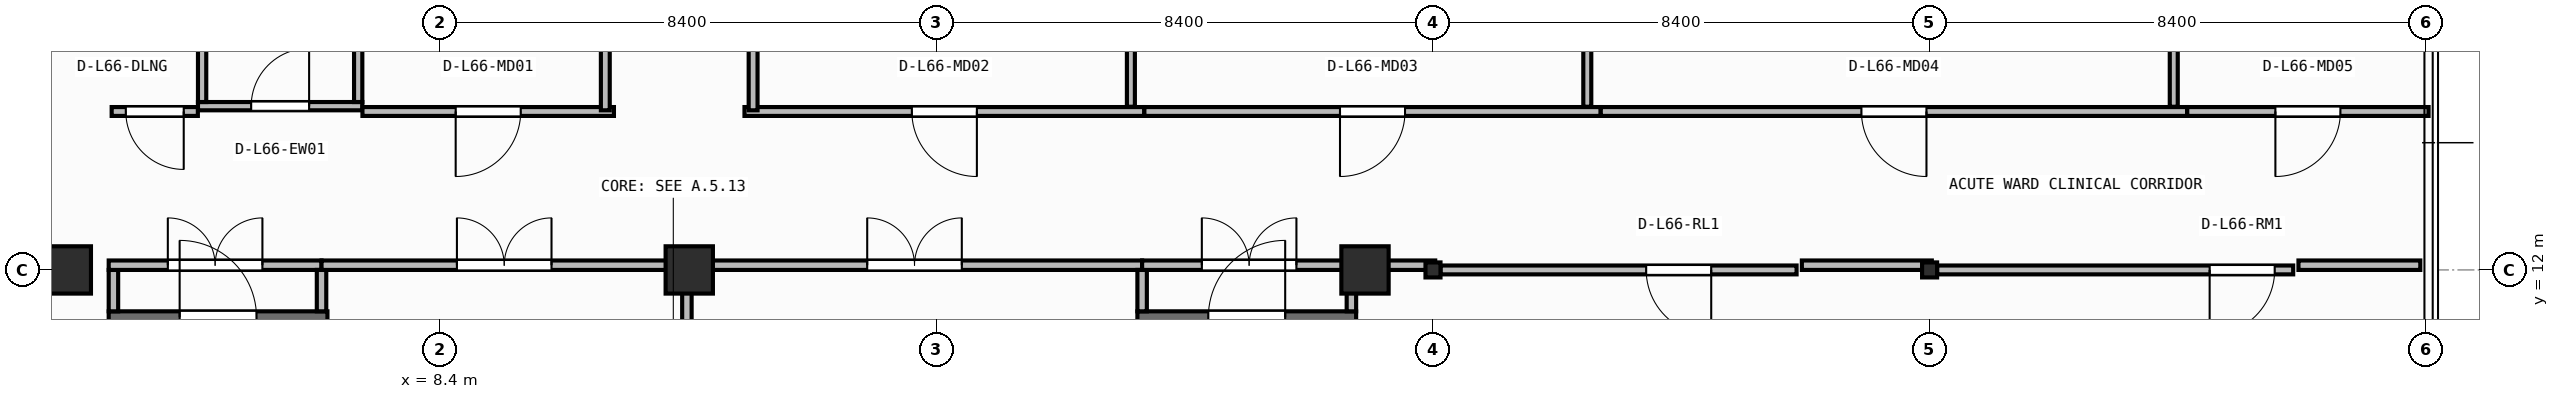
"""IFC4 building model, lengths in metres.
Left out: names, types, materials, properties, quantities, classifications, styles, units other than length and angle.
Written with IfcOpenShell. Run it as: python <this file> out.ifc"""

import sys

from ifc_helpers import new_model, si_unit, direction, frame, frame_2d, origin, origin_2d, place, context, subcontext, project, spatial, rectangle, i_section, extrude, element, fill, save


model = new_model("IFC4")
c1 = context("Model", 3, precision=1e-05, world=origin(), true_north=direction((0.0, 1.0)))
c2 = subcontext(c1, "Body", "Model", "MODEL_VIEW")
j1 = project(units=[si_unit("LENGTHUNIT", "METRE"), si_unit("PLANEANGLEUNIT", "RADIAN")], contexts=[c1])
p1 = place(None, origin())
s1 = spatial("IfcSite", under=j1, at=p1, CompositionType="ELEMENT")
p2 = place(p1, origin())
s2 = spatial("IfcBuilding", under=s1, at=p2, CompositionType="ELEMENT")
p3 = place(p2, frame((0.0, 0.0, 268.4)))
s3 = spatial("IfcBuildingStorey", under=s2, at=p3, CompositionType="ELEMENT", Elevation=268.4)
for number, where, z_axis, x_axis in (
    (1, (2.1, 12.0, 0.0), (0.0, 0.0, 1.0), (1.0, 0.0, 0.0)),
    (2, (12.62, 12.0, 0.0), (0.0, 0.0, 1.0), (1.0, 0.0, 0.0)),
    (3, (24.05, 12.0, 0.0), (0.0, 0.0, 1.0), (1.0, 0.0, 0.0)),
):
    element("IfcColumn", number, at=place(p3, frame(where, z_axis=z_axis, x_axis=x_axis)), inside=s3, PredefinedType="COLUMN", context=c2, shape_type="SweptSolid", body=[
        extrude(rectangle(XDim=0.8, YDim=0.8, at=origin_2d()), origin(), (0.0, 0.0, 1.0), 3.95),
    ])
for number, where, z_axis, x_axis in (
    (4, (25.2, 12.0, 0.0), (0.0, 0.0, 1.0), (1.0, 0.0, 0.0)),
    (5, (33.6, 12.0, 0.0), (0.0, 0.0, 1.0), (1.0, 0.0, 0.0)),
):
    element("IfcColumn", number, at=place(p3, frame(where, z_axis=z_axis, x_axis=x_axis)), inside=s3, PredefinedType="COLUMN", context=c2, shape_type="SweptSolid", body=[
        extrude(i_section(OverallWidth=0.254, OverallDepth=0.254, WebThickness=0.009, FlangeThickness=0.014, FilletRadius=0.013, at=origin_2d()), origin(), (0.0, 0.0, 1.0), 3.95),
    ])
p4 = place(p3, frame((2.8, 11.2, 0.0), z_axis=(0.0, 0.0, 1.0), x_axis=(1.0, 0.0, 0.0)))
e6 = element("IfcWall", 6, at=p4, inside=s3, PredefinedType="SHEAR", context=c2, shape_type="SweptSolid", body=[
    extrude(rectangle(XDim=3.7, YDim=0.2, at=frame_2d((1.85, 0.0))), origin(), (0.0, 0.0, 1.0), 3.71),
])
p5 = place(p4, frame((1.2, 0.0, 0.0)))
e7 = element("IfcOpeningElement", 7, at=p5, cuts=e6, PredefinedType="OPENING", context=c2, shape_type="SweptSolid", body=[
    extrude(rectangle(XDim=1.3, YDim=2.15, at=frame_2d((0.65, 1.075))), frame((0.0, 0.11, 0.0), z_axis=(0.0, -1.0, 0.0), x_axis=(1.0, 0.0, 0.0)), (0.0, 0.0, 1.0), 0.22),
])
p6 = place(p3, frame((20.2, 11.2, 0.0), z_axis=(0.0, 0.0, 1.0), x_axis=(1.0, 0.0, 0.0)))
e8 = element("IfcWall", 8, at=p6, inside=s3, PredefinedType="SHEAR", context=c2, shape_type="SweptSolid", body=[
    extrude(rectangle(XDim=3.7, YDim=0.2, at=frame_2d((1.85, 0.0))), origin(), (0.0, 0.0, 1.0), 3.71),
])
p7 = place(p6, frame((1.2, 0.0, 0.0)))
e9 = element("IfcOpeningElement", 9, at=p7, cuts=e8, PredefinedType="OPENING", context=c2, shape_type="SweptSolid", body=[
    extrude(rectangle(XDim=1.3, YDim=2.15, at=frame_2d((0.65, 1.075))), frame((0.0, 0.11, 0.0), z_axis=(0.0, -1.0, 0.0), x_axis=(1.0, 0.0, 0.0)), (0.0, 0.0, 1.0), 0.22),
])
p8 = place(p3, frame((2.88, 11.3, 0.0), z_axis=(0.0, 0.0, 1.0), x_axis=(0.0, 1.0, 0.0)))
e10 = element("IfcWall", 10, at=p8, inside=s3, PredefinedType="PARTITIONING", context=c2, shape_type="SweptSolid", body=[
    extrude(rectangle(XDim=0.7, YDim=0.16, at=frame_2d((0.35, 0.0))), origin(), (0.0, 0.0, 1.0), 3.71),
])
p9 = place(p3, frame((2.8, 12.08, 0.0), z_axis=(0.0, 0.0, 1.0), x_axis=(1.0, 0.0, 0.0)))
e11 = element("IfcWall", 11, at=p9, inside=s3, PredefinedType="PARTITIONING", context=c2, shape_type="SweptSolid", body=[
    extrude(rectangle(XDim=3.6, YDim=0.16, at=frame_2d((1.8, 0.0))), origin(), (0.0, 0.0, 1.0), 3.157),
])
p10 = place(p9, frame((1.0, 0.0, 0.0)))
e12 = element("IfcOpeningElement", 12, at=p10, cuts=e11, PredefinedType="OPENING", context=c2, shape_type="SweptSolid", body=[
    extrude(rectangle(XDim=1.6, YDim=2.05, at=frame_2d((0.8, 1.025))), frame((0.0, 0.09, 0.0), z_axis=(0.0, -1.0, 0.0), x_axis=(1.0, 0.0, 0.0)), (0.0, 0.0, 1.0), 0.18),
])
p11 = place(p3, frame((6.4, 11.3, 0.0), z_axis=(0.0, 0.0, 1.0), x_axis=(0.0, 1.0, 0.0)))
e13 = element("IfcWall", 13, at=p11, inside=s3, PredefinedType="PARTITIONING", context=c2, shape_type="SweptSolid", body=[
    extrude(rectangle(XDim=0.7, YDim=0.16, at=frame_2d((0.35, 0.0))), origin(), (0.0, 0.0, 1.0), 3.71),
])
p12 = place(p3, frame((6.4, 12.08, 0.0), z_axis=(0.0, 0.0, 1.0), x_axis=(1.0, 0.0, 0.0)))
e14 = element("IfcWall", 14, at=p12, inside=s3, PredefinedType="PARTITIONING", context=c2, shape_type="SweptSolid", body=[
    extrude(rectangle(XDim=6.18, YDim=0.16, at=frame_2d((3.09, 0.0))), origin(), (0.0, 0.0, 1.0), 3.157),
])
p13 = place(p12, frame((2.29, 0.0, 0.0)))
e15 = element("IfcOpeningElement", 15, at=p13, cuts=e14, PredefinedType="OPENING", context=c2, shape_type="SweptSolid", body=[
    extrude(rectangle(XDim=1.6, YDim=2.05, at=frame_2d((0.8, 1.025))), frame((0.0, 0.09, 0.0), z_axis=(0.0, -1.0, 0.0), x_axis=(1.0, 0.0, 0.0)), (0.0, 0.0, 1.0), 0.18),
])
p14 = place(p3, frame((12.58, 9.21, 0.0), z_axis=(0.0, 0.0, 1.0), x_axis=(0.0, 1.0, 0.0)))
e16 = element("IfcWall", 16, at=p14, inside=s3, PredefinedType="PARTITIONING", context=c2, shape_type="SweptSolid", body=[
    extrude(rectangle(XDim=2.79, YDim=0.16, at=frame_2d((1.395, 0.0))), origin(), (0.0, 0.0, 1.0), 3.71),
])
p15 = place(p3, frame((12.58, 12.08, 0.0), z_axis=(0.0, 0.0, 1.0), x_axis=(1.0, 0.0, 0.0)))
e17 = element("IfcWall", 17, at=p15, inside=s3, PredefinedType="PARTITIONING", context=c2, shape_type="SweptSolid", body=[
    extrude(rectangle(XDim=7.7, YDim=0.16, at=frame_2d((3.85, 0.0))), origin(), (0.0, 0.0, 1.0), 3.157),
])
p16 = place(p15, frame((3.05, 0.0, 0.0)))
e18 = element("IfcOpeningElement", 18, at=p16, cuts=e17, PredefinedType="OPENING", context=c2, shape_type="SweptSolid", body=[
    extrude(rectangle(XDim=1.6, YDim=2.05, at=frame_2d((0.8, 1.025))), frame((0.0, 0.09, 0.0), z_axis=(0.0, -1.0, 0.0), x_axis=(1.0, 0.0, 0.0)), (0.0, 0.0, 1.0), 0.18),
])
p17 = place(p3, frame((20.28, 11.3, 0.0), z_axis=(0.0, 0.0, 1.0), x_axis=(0.0, 1.0, 0.0)))
e19 = element("IfcWall", 19, at=p17, inside=s3, PredefinedType="PARTITIONING", context=c2, shape_type="SweptSolid", body=[
    extrude(rectangle(XDim=0.7, YDim=0.16, at=frame_2d((0.35, 0.0))), origin(), (0.0, 0.0, 1.0), 3.71),
])
p18 = place(p3, frame((20.28, 12.08, 0.0), z_axis=(0.0, 0.0, 1.0), x_axis=(1.0, 0.0, 0.0)))
e20 = element("IfcWall", 20, at=p18, inside=s3, PredefinedType="PARTITIONING", context=c2, shape_type="SweptSolid", body=[
    extrude(rectangle(XDim=3.62, YDim=0.16, at=frame_2d((1.81, 0.0))), origin(), (0.0, 0.0, 1.0), 3.157),
])
p19 = place(p18, frame((1.01, 0.0, 0.0)))
e21 = element("IfcOpeningElement", 21, at=p19, cuts=e20, PredefinedType="OPENING", context=c2, shape_type="SweptSolid", body=[
    extrude(rectangle(XDim=1.6, YDim=2.05, at=frame_2d((0.8, 1.025))), frame((0.0, 0.09, 0.0), z_axis=(0.0, -1.0, 0.0), x_axis=(1.0, 0.0, 0.0)), (0.0, 0.0, 1.0), 0.18),
])
p20 = place(p3, frame((23.82, 11.3, 0.0), z_axis=(0.0, 0.0, 1.0), x_axis=(0.0, 1.0, 0.0)))
e22 = element("IfcWall", 22, at=p20, inside=s3, PredefinedType="PARTITIONING", context=c2, shape_type="SweptSolid", body=[
    extrude(rectangle(XDim=0.7, YDim=0.16, at=frame_2d((0.35, 0.0))), origin(), (0.0, 0.0, 1.0), 3.71),
])
p21 = place(p3, frame((4.31, 14.77, 0.0), z_axis=(0.0, 0.0, 1.0), x_axis=(1.0, 0.0, 0.0)))
e23 = element("IfcWall", 23, at=p21, inside=s3, PredefinedType="PARTITIONING", context=c2, shape_type="SweptSolid", body=[
    extrude(rectangle(XDim=2.78, YDim=0.14, at=frame_2d((1.39, 0.0))), origin(), (0.0, 0.0, 1.0), 3.71),
])
p22 = place(p21, frame((0.9, 0.0, 0.0)))
e24 = element("IfcOpeningElement", 24, at=p22, cuts=e23, PredefinedType="OPENING", context=c2, shape_type="SweptSolid", body=[
    extrude(rectangle(XDim=0.98, YDim=2.1, at=frame_2d((0.49, 1.05))), frame((0.0, 0.08, 0.0), z_axis=(0.0, -1.0, 0.0), x_axis=(1.0, 0.0, 0.0)), (0.0, 0.0, 1.0), 0.16),
])
for number, where, z_axis, x_axis in (
    (25, (4.38, 14.84, 0.0), (0.0, 0.0, 1.0), (0.0, 1.0, 0.0)),
    (26, (7.02, 14.84, 0.0), (0.0, 0.0, 1.0), (0.0, 1.0, 0.0)),
):
    element("IfcWall", number, at=place(p3, frame(where, z_axis=z_axis, x_axis=x_axis)), inside=s3, PredefinedType="PARTITIONING", context=c2, shape_type="SweptSolid", body=[
        extrude(rectangle(XDim=2.2, YDim=0.14, at=frame_2d((1.1, 0.0))), origin(), (0.0, 0.0, 1.0), 3.71),
    ])
p23 = place(p3, frame((31.35, 12.0, 0.0), z_axis=(0.0, 0.0, 1.0), x_axis=(-1.0, 0.0, 0.0)))
e27 = element("IfcWall", 27, at=p23, inside=s3, PredefinedType="PARTITIONING", context=c2, shape_type="SweptSolid", body=[
    extrude(rectangle(XDim=6.023, YDim=0.15, at=frame_2d((3.012, 0.0))), origin(), (0.0, 0.0, 1.0), 3.157),
])
p24 = place(p23, frame((1.444, 0.0, 0.0)))
e28 = element("IfcOpeningElement", 28, at=p24, cuts=e27, PredefinedType="OPENING", context=c2, shape_type="SweptSolid", body=[
    extrude(rectangle(XDim=1.1, YDim=2.1, at=frame_2d((0.55, 1.05))), frame((0.0, 0.085, 0.0), z_axis=(0.0, -1.0, 0.0), x_axis=(1.0, 0.0, 0.0)), (0.0, 0.0, 1.0), 0.17),
])
p25 = place(p3, frame((39.75, 12.0, 0.0), z_axis=(0.0, 0.0, 1.0), x_axis=(-1.0, 0.0, 0.0)))
e29 = element("IfcWall", 29, at=p25, inside=s3, PredefinedType="PARTITIONING", context=c2, shape_type="SweptSolid", body=[
    extrude(rectangle(XDim=6.023, YDim=0.15, at=frame_2d((3.011, 0.0))), origin(), (0.0, 0.0, 1.0), 3.71),
])
p26 = place(p25, frame((0.313, 0.0, 0.0)))
e30 = element("IfcOpeningElement", 30, at=p26, cuts=e29, PredefinedType="OPENING", context=c2, shape_type="SweptSolid", body=[
    extrude(rectangle(XDim=1.1, YDim=2.1, at=frame_2d((0.55, 1.05))), frame((0.0, 0.085, 0.0), z_axis=(0.0, -1.0, 0.0), x_axis=(1.0, 0.0, 0.0)), (0.0, 0.0, 1.0), 0.17),
])
p27 = place(p3, frame((4.308, 14.68, 0.0), z_axis=(0.0, 0.0, 1.0), x_axis=(-1.0, 0.0, 0.0)))
e31 = element("IfcWall", 31, at=p27, inside=s3, PredefinedType="PARTITIONING", context=c2, shape_type="SweptSolid", body=[
    extrude(rectangle(XDim=1.458, YDim=0.15, at=frame_2d((0.729, 0.0))), origin(), (0.0, 0.0, 1.0), 3.71),
])
p28 = place(p27, frame((0.239, 0.0, 0.0)))
e32 = element("IfcOpeningElement", 32, at=p28, cuts=e31, PredefinedType="OPENING", context=c2, shape_type="SweptSolid", body=[
    extrude(rectangle(XDim=0.98, YDim=2.1, at=frame_2d((0.49, 1.05))), frame((0.0, 0.085, 0.0), z_axis=(0.0, -1.0, 0.0), x_axis=(1.0, 0.0, 0.0)), (0.0, 0.0, 1.0), 0.17),
])
p29 = place(p3, frame((11.346, 14.68, 0.0), z_axis=(0.0, 0.0, 1.0), x_axis=(-1.0, 0.0, 0.0)))
e33 = element("IfcWall", 33, at=p29, inside=s3, PredefinedType="PARTITIONING", context=c2, shape_type="SweptSolid", body=[
    extrude(rectangle(XDim=4.254, YDim=0.15, at=frame_2d((2.127, 0.0))), origin(), (0.0, 0.0, 1.0), 3.71),
])
p30 = place(p29, frame((1.577, 0.0, 0.0)))
e34 = element("IfcOpeningElement", 34, at=p30, cuts=e33, PredefinedType="OPENING", context=c2, shape_type="SweptSolid", body=[
    extrude(rectangle(XDim=1.1, YDim=2.1, at=frame_2d((0.55, 1.05))), frame((0.0, 0.085, 0.0), z_axis=(0.0, -1.0, 0.0), x_axis=(1.0, 0.0, 0.0)), (0.0, 0.0, 1.0), 0.17),
])
p31 = place(p3, frame((20.316, 14.68, 0.0), z_axis=(0.0, 0.0, 1.0), x_axis=(-1.0, 0.0, 0.0)))
e35 = element("IfcWall", 35, at=p31, inside=s3, PredefinedType="PARTITIONING", context=c2, shape_type="SweptSolid", body=[
    extrude(rectangle(XDim=6.762, YDim=0.15, at=frame_2d((3.381, 0.0))), origin(), (0.0, 0.0, 1.0), 3.71),
])
p32 = place(p31, frame((2.831, 0.0, 0.0)))
e36 = element("IfcOpeningElement", 36, at=p32, cuts=e35, PredefinedType="OPENING", context=c2, shape_type="SweptSolid", body=[
    extrude(rectangle(XDim=1.1, YDim=2.1, at=frame_2d((0.55, 1.05))), frame((0.0, 0.085, 0.0), z_axis=(0.0, -1.0, 0.0), x_axis=(1.0, 0.0, 0.0)), (0.0, 0.0, 1.0), 0.17),
])
p33 = place(p3, frame((28.036, 14.68, 0.0), z_axis=(0.0, 0.0, 1.0), x_axis=(-1.0, 0.0, 0.0)))
e37 = element("IfcWall", 37, at=p33, inside=s3, PredefinedType="PARTITIONING", context=c2, shape_type="SweptSolid", body=[
    extrude(rectangle(XDim=7.718, YDim=0.15, at=frame_2d((3.859, 0.0))), origin(), (0.0, 0.0, 1.0), 3.71),
])
p34 = place(p33, frame((3.309, 0.0, 0.0)))
e38 = element("IfcOpeningElement", 38, at=p34, cuts=e37, PredefinedType="OPENING", context=c2, shape_type="SweptSolid", body=[
    extrude(rectangle(XDim=1.1, YDim=2.1, at=frame_2d((0.55, 1.05))), frame((0.0, 0.085, 0.0), z_axis=(0.0, -1.0, 0.0), x_axis=(1.0, 0.0, 0.0)), (0.0, 0.0, 1.0), 0.17),
])
p35 = place(p3, frame((37.956, 14.68, 0.0), z_axis=(0.0, 0.0, 1.0), x_axis=(-1.0, 0.0, 0.0)))
e39 = element("IfcWall", 39, at=p35, inside=s3, PredefinedType="PARTITIONING", context=c2, shape_type="SweptSolid", body=[
    extrude(rectangle(XDim=9.918, YDim=0.15, at=frame_2d((4.959, 0.0))), origin(), (0.0, 0.0, 1.0), 3.71),
])
p36 = place(p35, frame((4.409, 0.0, 0.0)))
e40 = element("IfcOpeningElement", 40, at=p36, cuts=e39, PredefinedType="OPENING", context=c2, shape_type="SweptSolid", body=[
    extrude(rectangle(XDim=1.1, YDim=2.1, at=frame_2d((0.55, 1.05))), frame((0.0, 0.085, 0.0), z_axis=(0.0, -1.0, 0.0), x_axis=(1.0, 0.0, 0.0)), (0.0, 0.0, 1.0), 0.17),
])
p37 = place(p3, frame((42.04, 14.68, 0.0), z_axis=(0.0, 0.0, 1.0), x_axis=(-1.0, 0.0, 0.0)))
e41 = element("IfcWall", 41, at=p37, inside=s3, PredefinedType="PARTITIONING", context=c2, shape_type="SweptSolid", body=[
    extrude(rectangle(XDim=4.082, YDim=0.15, at=frame_2d((2.041, 0.0))), origin(), (0.0, 0.0, 1.0), 3.71),
])
p38 = place(p37, frame((1.491, 0.0, 0.0)))
e42 = element("IfcOpeningElement", 42, at=p38, cuts=e41, PredefinedType="OPENING", context=c2, shape_type="SweptSolid", body=[
    extrude(rectangle(XDim=1.1, YDim=2.1, at=frame_2d((0.55, 1.05))), frame((0.0, 0.085, 0.0), z_axis=(0.0, -1.0, 0.0), x_axis=(1.0, 0.0, 0.0)), (0.0, 0.0, 1.0), 0.17),
])
for number, where, z_axis, x_axis in (
    (43, (11.2, 21.066, 0.0), (0.0, 0.0, 1.0), (0.0, -1.0, 0.0)),
    (44, (13.7, 14.7, 0.0), (0.0, 0.0, 1.0), (0.0, 1.0, 0.0)),
):
    element("IfcWall", number, at=place(p3, frame(where, z_axis=z_axis, x_axis=x_axis)), inside=s3, PredefinedType="PARTITIONING", context=c2, shape_type="SweptSolid", body=[
        extrude(rectangle(XDim=6.366, YDim=0.15, at=frame_2d((3.183, 0.0))), origin(), (0.0, 0.0, 1.0), 3.71),
    ])
for number, where, z_axis, x_axis in (
    (45, (20.09, 14.76, 0.0), (0.0, 0.0, 1.0), (0.0, 1.0, 0.0)),
    (46, (27.81, 14.76, 0.0), (0.0, 0.0, 1.0), (0.0, 1.0, 0.0)),
    (47, (37.73, 14.76, 0.0), (0.0, 0.0, 1.0), (0.0, 1.0, 0.0)),
):
    element("IfcWall", number, at=place(p3, frame(where, z_axis=z_axis, x_axis=x_axis)), inside=s3, PredefinedType="PARTITIONING", context=c2, shape_type="SweptSolid", body=[
        extrude(rectangle(XDim=6.08, YDim=0.135, at=frame_2d((3.04, 0.0))), origin(), (0.0, 0.0, 1.0), 3.71),
    ])
p39 = place(p3, frame((24.02, 12.08, 0.0), z_axis=(0.0, 0.0, 1.0), x_axis=(1.0, 0.0, 0.0)))
e48 = element("IfcWall", 48, at=p39, inside=s3, PredefinedType="PARTITIONING", context=c2, shape_type="SweptSolid", body=[
    extrude(rectangle(XDim=1.218, YDim=0.16, at=frame_2d((0.609, 0.0))), origin(), (0.0, 0.0, 1.0), 3.157),
])
p40 = place(p3, frame((31.439, 12.08, 0.0), z_axis=(0.0, 0.0, 1.0), x_axis=(1.0, 0.0, 0.0)))
e49 = element("IfcWall", 49, at=p40, inside=s3, PredefinedType="PARTITIONING", context=c2, shape_type="SweptSolid", body=[
    extrude(rectangle(XDim=2.198, YDim=0.16, at=frame_2d((1.099, 0.0))), origin(), (0.0, 0.0, 1.0), 3.157),
])
p41 = place(p3, frame((39.839, 12.08, 0.0), z_axis=(0.0, 0.0, 1.0), x_axis=(1.0, 0.0, 0.0)))
e50 = element("IfcWall", 50, at=p41, inside=s3, PredefinedType="PARTITIONING", context=c2, shape_type="SweptSolid", body=[
    extrude(rectangle(XDim=2.061, YDim=0.16, at=frame_2d((1.03, 0.0))), origin(), (0.0, 0.0, 1.0), 3.71),
])
p42 = place(p5, origin())
e51 = element("IfcDoor", 51, at=p42, inside=s3, OperationType="SINGLE_SWING_LEFT", PredefinedType="DOOR", context=c2, shape_type="SweptSolid", body=[
    extrude(rectangle(XDim=1.3, YDim=2.15, at=frame_2d((0.65, 1.075))), frame((0.0, 0.025, 0.0), z_axis=(0.0, -1.0, 0.0), x_axis=(1.0, 0.0, 0.0)), (0.0, 0.0, 1.0), 0.05),
])
fill(e7, e51)
p43 = place(p7, origin())
e52 = element("IfcDoor", 52, at=p43, inside=s3, OperationType="SINGLE_SWING_RIGHT", PredefinedType="DOOR", context=c2, shape_type="SweptSolid", body=[
    extrude(rectangle(XDim=1.3, YDim=2.15, at=frame_2d((0.65, 1.075))), frame((0.0, 0.025, 0.0), z_axis=(0.0, -1.0, 0.0), x_axis=(1.0, 0.0, 0.0)), (0.0, 0.0, 1.0), 0.05),
])
fill(e9, e52)
p44 = place(p10, origin())
e53 = element("IfcDoor", 53, at=p44, inside=s3, OperationType="DOUBLE_DOOR_SINGLE_SWING", PredefinedType="DOOR", context=c2, shape_type="SweptSolid", body=[
    extrude(rectangle(XDim=1.6, YDim=2.05, at=frame_2d((0.8, 1.025))), frame((0.0, 0.025, 0.0), z_axis=(0.0, -1.0, 0.0), x_axis=(1.0, 0.0, 0.0)), (0.0, 0.0, 1.0), 0.05),
])
fill(e12, e53)
p45 = place(p13, origin())
e54 = element("IfcDoor", 54, at=p45, inside=s3, OperationType="DOUBLE_DOOR_SINGLE_SWING", PredefinedType="DOOR", context=c2, shape_type="SweptSolid", body=[
    extrude(rectangle(XDim=1.6, YDim=2.05, at=frame_2d((0.8, 1.025))), frame((0.0, 0.025, 0.0), z_axis=(0.0, -1.0, 0.0), x_axis=(1.0, 0.0, 0.0)), (0.0, 0.0, 1.0), 0.05),
])
fill(e15, e54)
p46 = place(p16, origin())
e55 = element("IfcDoor", 55, at=p46, inside=s3, OperationType="DOUBLE_DOOR_SINGLE_SWING", PredefinedType="DOOR", context=c2, shape_type="SweptSolid", body=[
    extrude(rectangle(XDim=1.6, YDim=2.05, at=frame_2d((0.8, 1.025))), frame((0.0, 0.025, 0.0), z_axis=(0.0, -1.0, 0.0), x_axis=(1.0, 0.0, 0.0)), (0.0, 0.0, 1.0), 0.05),
])
fill(e18, e55)
p47 = place(p19, origin())
e56 = element("IfcDoor", 56, at=p47, inside=s3, OperationType="DOUBLE_DOOR_SINGLE_SWING", PredefinedType="DOOR", context=c2, shape_type="SweptSolid", body=[
    extrude(rectangle(XDim=1.6, YDim=2.05, at=frame_2d((0.8, 1.025))), frame((0.0, 0.025, 0.0), z_axis=(0.0, -1.0, 0.0), x_axis=(1.0, 0.0, 0.0)), (0.0, 0.0, 1.0), 0.05),
])
fill(e21, e56)
p48 = place(p22, origin())
e57 = element("IfcDoor", 57, at=p48, inside=s3, OperationType="SINGLE_SWING_RIGHT", PredefinedType="DOOR", context=c2, shape_type="SweptSolid", body=[
    extrude(rectangle(XDim=0.98, YDim=2.1, at=frame_2d((0.49, 1.05))), frame((0.0, 0.025, 0.0), z_axis=(0.0, -1.0, 0.0), x_axis=(1.0, 0.0, 0.0)), (0.0, 0.0, 1.0), 0.05),
])
fill(e24, e57)
p49 = place(p24, origin())
e58 = element("IfcDoor", 58, at=p49, inside=s3, OperationType="SINGLE_SWING_LEFT", PredefinedType="DOOR", context=c2, shape_type="SweptSolid", body=[
    extrude(rectangle(XDim=1.1, YDim=2.1, at=frame_2d((0.55, 1.05))), frame((0.0, 0.025, 0.0), z_axis=(0.0, -1.0, 0.0), x_axis=(1.0, 0.0, 0.0)), (0.0, 0.0, 1.0), 0.05),
])
fill(e28, e58)
p50 = place(p26, origin())
e59 = element("IfcDoor", 59, at=p50, inside=s3, OperationType="SINGLE_SWING_RIGHT", PredefinedType="DOOR", context=c2, shape_type="SweptSolid", body=[
    extrude(rectangle(XDim=1.1, YDim=2.1, at=frame_2d((0.55, 1.05))), frame((0.0, 0.025, 0.0), z_axis=(0.0, -1.0, 0.0), x_axis=(1.0, 0.0, 0.0)), (0.0, 0.0, 1.0), 0.05),
])
fill(e30, e59)
p51 = place(p28, origin())
e60 = element("IfcDoor", 60, at=p51, inside=s3, OperationType="SINGLE_SWING_LEFT", PredefinedType="DOOR", context=c2, shape_type="SweptSolid", body=[
    extrude(rectangle(XDim=0.98, YDim=2.1, at=frame_2d((0.49, 1.05))), frame((0.0, 0.025, 0.0), z_axis=(0.0, -1.0, 0.0), x_axis=(1.0, 0.0, 0.0)), (0.0, 0.0, 1.0), 0.05),
])
fill(e32, e60)
p52 = place(p30, origin())
e61 = element("IfcDoor", 61, at=p52, inside=s3, OperationType="SINGLE_SWING_RIGHT", PredefinedType="DOOR", context=c2, shape_type="SweptSolid", body=[
    extrude(rectangle(XDim=1.1, YDim=2.1, at=frame_2d((0.55, 1.05))), frame((0.0, 0.025, 0.0), z_axis=(0.0, -1.0, 0.0), x_axis=(1.0, 0.0, 0.0)), (0.0, 0.0, 1.0), 0.05),
])
fill(e34, e61)
p53 = place(p32, origin())
e62 = element("IfcDoor", 62, at=p53, inside=s3, OperationType="SINGLE_SWING_LEFT", PredefinedType="DOOR", context=c2, shape_type="SweptSolid", body=[
    extrude(rectangle(XDim=1.1, YDim=2.1, at=frame_2d((0.55, 1.05))), frame((0.0, 0.025, 0.0), z_axis=(0.0, -1.0, 0.0), x_axis=(1.0, 0.0, 0.0)), (0.0, 0.0, 1.0), 0.05),
])
fill(e36, e62)
p54 = place(p34, origin())
e63 = element("IfcDoor", 63, at=p54, inside=s3, OperationType="SINGLE_SWING_RIGHT", PredefinedType="DOOR", context=c2, shape_type="SweptSolid", body=[
    extrude(rectangle(XDim=1.1, YDim=2.1, at=frame_2d((0.55, 1.05))), frame((0.0, 0.025, 0.0), z_axis=(0.0, -1.0, 0.0), x_axis=(1.0, 0.0, 0.0)), (0.0, 0.0, 1.0), 0.05),
])
fill(e38, e63)
p55 = place(p36, origin())
e64 = element("IfcDoor", 64, at=p55, inside=s3, OperationType="SINGLE_SWING_LEFT", PredefinedType="DOOR", context=c2, shape_type="SweptSolid", body=[
    extrude(rectangle(XDim=1.1, YDim=2.1, at=frame_2d((0.55, 1.05))), frame((0.0, 0.025, 0.0), z_axis=(0.0, -1.0, 0.0), x_axis=(1.0, 0.0, 0.0)), (0.0, 0.0, 1.0), 0.05),
])
fill(e40, e64)
p56 = place(p38, origin())
e65 = element("IfcDoor", 65, at=p56, inside=s3, OperationType="SINGLE_SWING_RIGHT", PredefinedType="DOOR", context=c2, shape_type="SweptSolid", body=[
    extrude(rectangle(XDim=1.1, YDim=2.1, at=frame_2d((0.55, 1.05))), frame((0.0, 0.025, 0.0), z_axis=(0.0, -1.0, 0.0), x_axis=(1.0, 0.0, 0.0)), (0.0, 0.0, 1.0), 0.05),
])
fill(e42, e65)
save(model, sys.argv[1])
